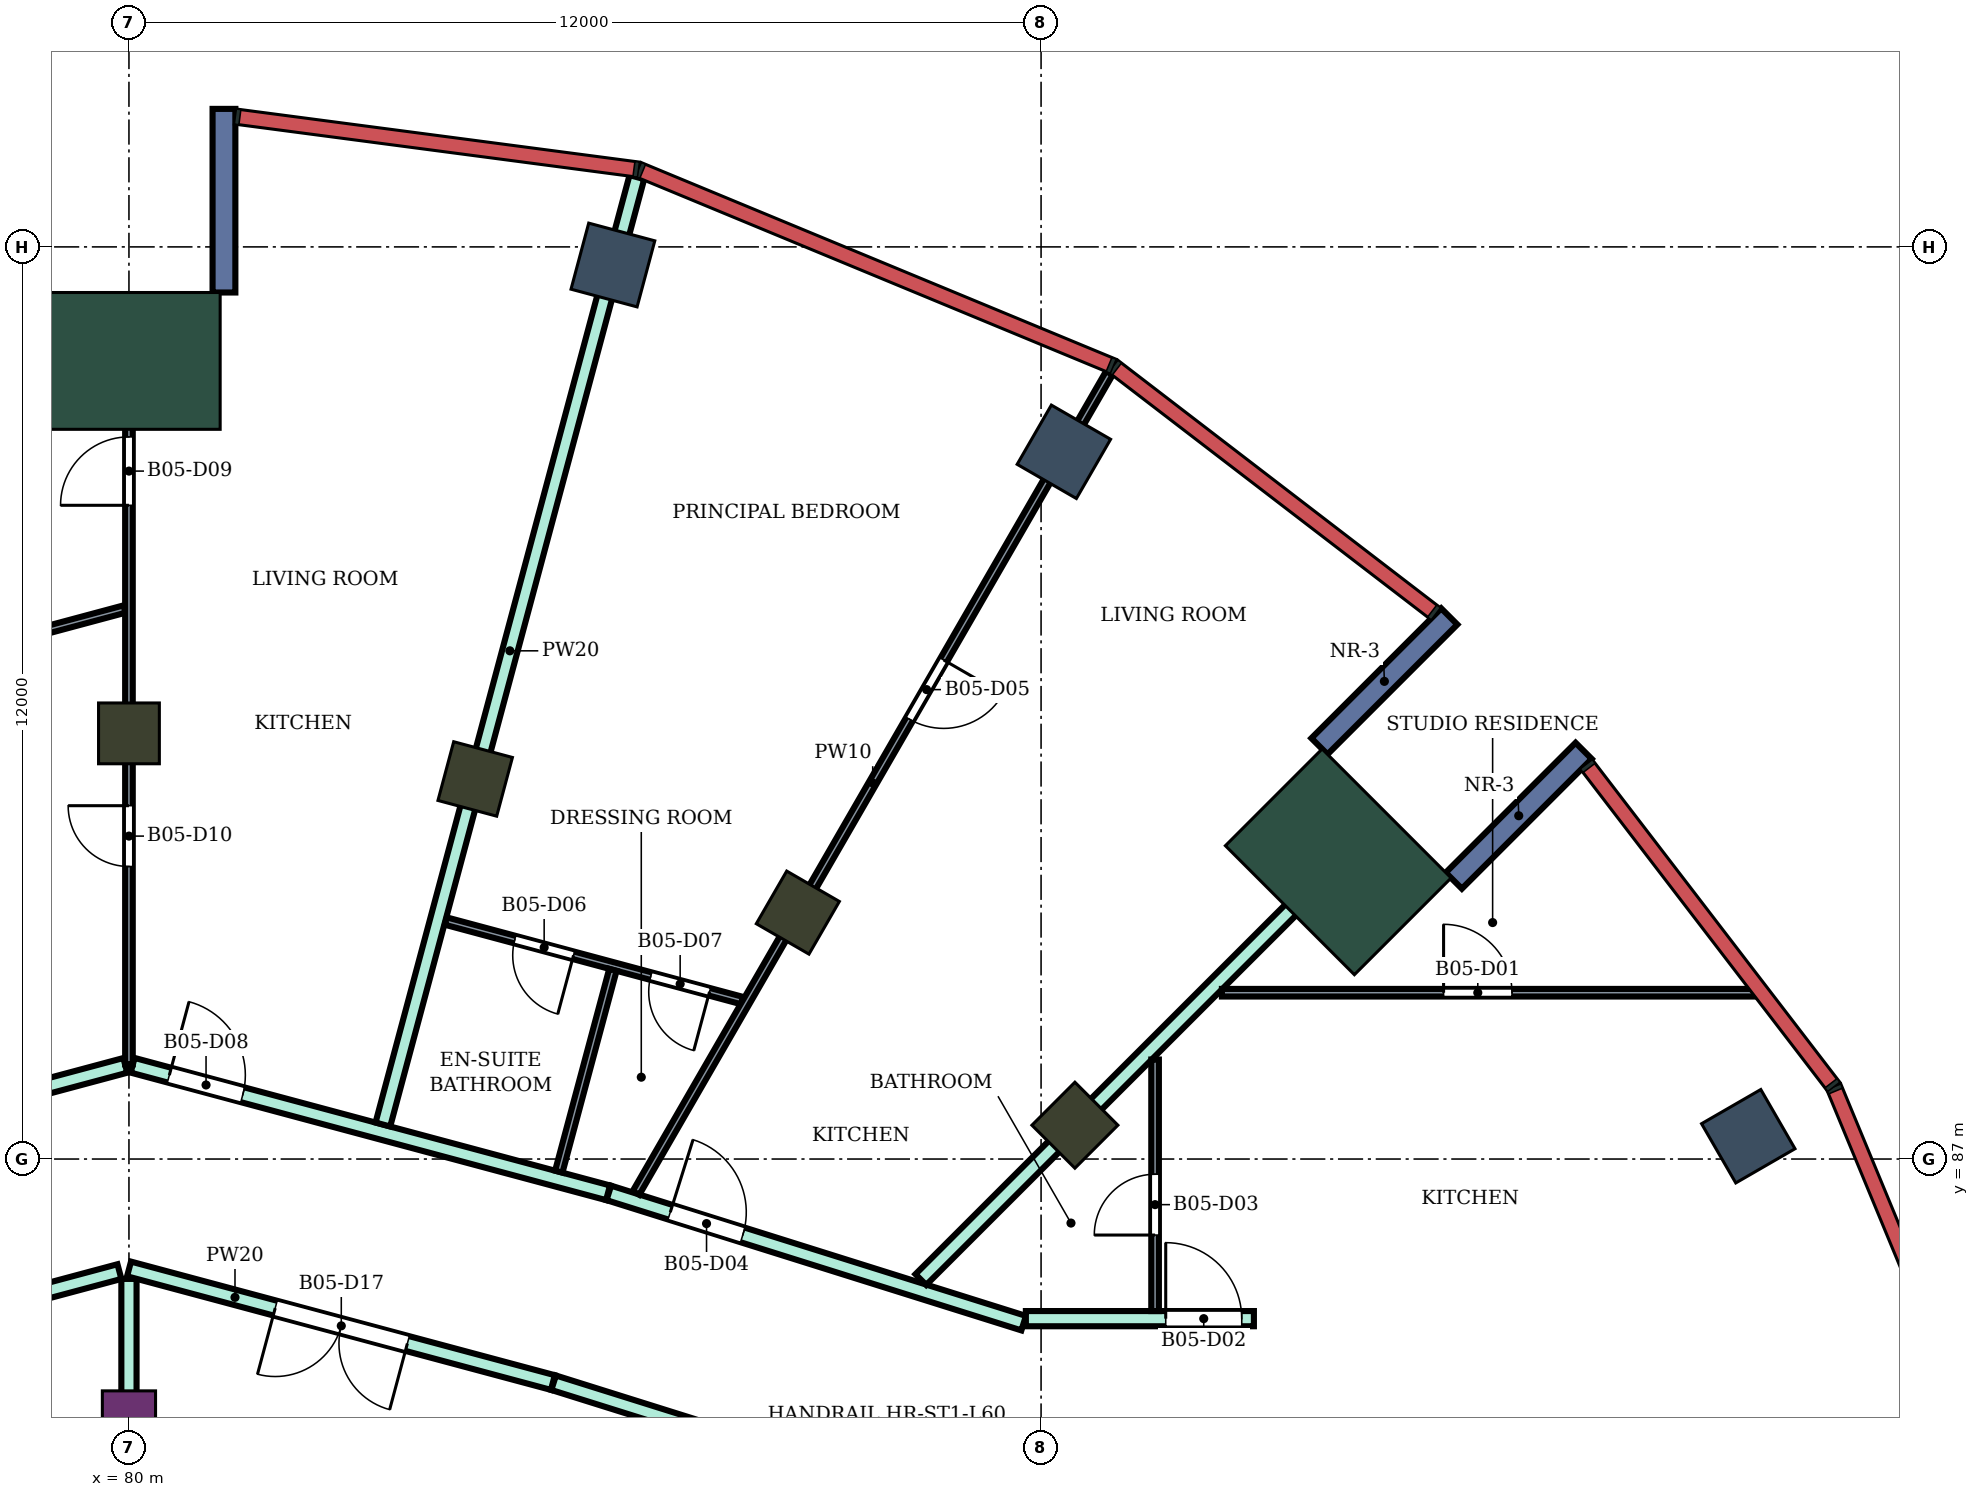
"""IFC4 building model, lengths in metres.
Left out: names, types, materials, properties, quantities, classifications, styles, units other than length and angle.
Written with IfcOpenShell. Run it as: python <this file> out.ifc"""

import sys

from ifc_helpers import new_model, si_unit, direction, frame, frame_2d, origin, origin_2d, place, context, subcontext, project, spatial, rectangle, extrude, element, fill, save


model = new_model("IFC4")
c1 = context("Model", 3, precision=1e-05, world=origin(), true_north=direction((0.0, 1.0)))
c2 = subcontext(c1, "Body", "Model", "MODEL_VIEW")
j1 = project(units=[si_unit("LENGTHUNIT", "METRE"), si_unit("PLANEANGLEUNIT", "RADIAN")], contexts=[c1])
p1 = place(None, origin())
s1 = spatial("IfcSite", under=j1, at=p1, CompositionType="ELEMENT")
p2 = place(p1, origin())
s2 = spatial("IfcBuilding", under=s1, at=p2, CompositionType="ELEMENT")
p3 = place(p2, frame((0.0, 0.0, 262.5)))
s3 = spatial("IfcBuildingStorey", under=s2, at=p3, CompositionType="ELEMENT", Elevation=262.5)
for number, where, z_axis, x_axis in (
    (1, (101.304, 87.3, 0.0), (0.0, 0.0, 1.0), (0.866, 0.5, 0.0)),
    (2, (92.3, 96.304, 0.0), (0.0, 0.0, 1.0), (0.5, 0.866, 0.0)),
    (3, (86.367, 98.762, 0.0), (0.0, 0.0, 1.0), (0.259, 0.966, 0.0)),
):
    element("IfcColumn", number, at=place(p3, frame(where, z_axis=z_axis, x_axis=x_axis)), inside=s3, PredefinedType="COLUMN", context=c2, shape_type="SweptSolid", body=[
        extrude(rectangle(XDim=0.9, YDim=0.9, at=origin_2d()), origin(), (0.0, 0.0, 1.0), 4.2),
    ])
for number, where, z_axis, x_axis in (
    (4, (92.445, 87.445, 0.0), (0.0, 0.0, 1.0), (0.707, 0.707, 0.0)),
    (5, (88.8, 90.242, 0.0), (0.0, 0.0, 1.0), (0.5, 0.866, 0.0)),
    (6, (84.555, 92.0, 0.0), (0.0, 0.0, 1.0), (0.259, 0.966, 0.0)),
    (7, (80.0, 92.6, 0.0), (0.0, 0.0, 1.0), (0.0, 1.0, 0.0)),
):
    element("IfcColumn", number, at=place(p3, frame(where, z_axis=z_axis, x_axis=x_axis)), inside=s3, PredefinedType="COLUMN", context=c2, shape_type="SweptSolid", body=[
        extrude(rectangle(XDim=0.8, YDim=0.8, at=origin_2d()), origin(), (0.0, 0.0, 1.0), 4.2),
    ])
p4 = place(p3, frame((80.0, 83.6, 0.0), z_axis=(0.0, 0.0, 1.0), x_axis=(0.0, 1.0, 0.0)))
e8 = element("IfcColumn", 8, at=p4, inside=s3, PredefinedType="COLUMN", context=c2, shape_type="SweptSolid", body=[
    extrude(rectangle(XDim=0.7, YDim=0.7, at=origin_2d()), origin(), (0.0, 0.0, 1.0), 4.2),
])
for number, where, z_axis, x_axis in (
    (9, (95.91, 90.91, 0.0), (0.0, 0.0, 1.0), (0.707, 0.707, 0.0)),
    (10, (80.0, 97.5, 0.0), (0.0, 0.0, 1.0), (0.0, 1.0, 0.0)),
):
    element("IfcColumn", number, at=place(p3, frame(where, z_axis=z_axis, x_axis=x_axis)), inside=s3, PredefinedType="COLUMN", context=c2, shape_type="SweptSolid", body=[
        extrude(rectangle(XDim=1.8, YDim=2.4, at=origin_2d()), origin(), (0.0, 0.0, 1.0), 4.2),
    ])
for number, where, z_axis, x_axis in (
    (11, (97.43, 90.662, 0.0), (0.0, 0.0, 1.0), (0.707, 0.707, 0.0)),
    (12, (95.662, 92.43, 0.0), (0.0, 0.0, 1.0), (0.707, 0.707, 0.0)),
    (13, (81.25, 98.4, 0.0), (0.0, 0.0, 1.0), (0.0, 1.0, 0.0)),
):
    element("IfcWall", number, at=place(p3, frame(where, z_axis=z_axis, x_axis=x_axis)), inside=s3, PredefinedType="NOTDEFINED", context=c2, shape_type="SweptSolid", body=[
        extrude(rectangle(XDim=2.416, YDim=0.3, at=frame_2d((1.208, 0.0))), origin(), (0.0, 0.0, 1.0), 4.2),
    ])
p5 = place(p3, frame((73.687, 86.554, 0.0), z_axis=(0.0, 0.0, 1.0), x_axis=(0.965961994098, 0.258684027257, 0.0)))
e14 = element("IfcWall", 14, at=p5, inside=s3, PredefinedType="PARTITIONING", context=c2, shape_type="SweptSolid", body=[
    extrude(rectangle(XDim=6.486, YDim=0.2, at=frame_2d((3.243, 0.0))), origin(), (0.0, 0.0, 1.0), 3.75),
])
p6 = place(p3, frame((74.413, 84.057, 0.0), z_axis=(0.0, 0.0, 1.0), x_axis=(0.965972135939, 0.258646153246, 0.0)))
e15 = element("IfcWall", 15, at=p6, inside=s3, PredefinedType="PARTITIONING", context=c2, shape_type="SweptSolid", body=[
    extrude(rectangle(XDim=5.654, YDim=0.2, at=frame_2d((2.827, 0.0))), origin(), (0.0, 0.0, 1.0), 3.75),
])
p7 = place(p6, frame((2.593, 0.0, 0.0)))
e16 = element("IfcOpeningElement", 16, at=p7, cuts=e15, PredefinedType="OPENING", context=c2, shape_type="SweptSolid", body=[
    extrude(rectangle(XDim=0.9, YDim=2.1, at=frame_2d((0.45, 1.05))), frame((0.0, 0.11, 0.0), z_axis=(0.0, -1.0, 0.0), x_axis=(1.0, 0.0, 0.0)), (0.0, 0.0, 1.0), 0.22),
])
p8 = place(p3, frame((80.0, 82.7, 0.0), z_axis=(0.0, 0.0, 1.0), x_axis=(0.0, 1.0, 0.0)))
e17 = element("IfcWall", 17, at=p8, inside=s3, PredefinedType="PARTITIONING", context=c2, shape_type="SweptSolid", body=[
    extrude(rectangle(XDim=2.723, YDim=0.2, at=frame_2d((1.362, 0.0))), origin(), (0.0, 0.0, 1.0), 3.75),
])
p9 = place(p3, frame((80.048, 88.233, 0.0), z_axis=(0.0, 0.0, 1.0), x_axis=(0.965867917069, -0.259035068625, 0.0)))
e18 = element("IfcWall", 18, at=p9, inside=s3, PredefinedType="PARTITIONING", context=c2, shape_type="SweptSolid", body=[
    extrude(rectangle(XDim=6.476, YDim=0.2, at=frame_2d((3.238, 0.0))), origin(), (0.0, 0.0, 1.0), 3.75),
])
p10 = place(p9, frame((0.5, 0.0, 0.0)))
e19 = element("IfcOpeningElement", 19, at=p10, cuts=e18, PredefinedType="OPENING", context=c2, shape_type="SweptSolid", body=[
    extrude(rectangle(XDim=1.0, YDim=2.1, at=frame_2d((0.5, 1.05))), frame((0.0, 0.11, 0.0), z_axis=(0.0, -1.0, 0.0), x_axis=(1.0, 0.0, 0.0)), (0.0, 0.0, 1.0), 0.22),
])
p11 = place(p3, frame((80.001, 85.554, 0.0), z_axis=(0.0, 0.0, 1.0), x_axis=(0.965917658836, -0.258849524528, 0.0)))
e20 = element("IfcWall", 20, at=p11, inside=s3, PredefinedType="PARTITIONING", context=c2, shape_type="SweptSolid", body=[
    extrude(rectangle(XDim=5.773, YDim=0.2, at=frame_2d((2.887, 0.0))), origin(), (0.0, 0.0, 1.0), 3.75),
])
p12 = place(p11, frame((1.991, 0.0, 0.0)))
e21 = element("IfcOpeningElement", 21, at=p12, cuts=e20, PredefinedType="OPENING", context=c2, shape_type="SweptSolid", body=[
    extrude(rectangle(XDim=1.8, YDim=2.1, at=frame_2d((0.9, 1.05))), frame((0.0, 0.11, 0.0), z_axis=(0.0, -1.0, 0.0), x_axis=(1.0, 0.0, 0.0)), (0.0, 0.0, 1.0), 0.22),
])
p13 = place(p3, frame((83.341, 87.454, 0.0), z_axis=(0.0, 0.0, 1.0), x_axis=(0.258971872038, 0.965884863477, 0.0)))
e22 = element("IfcWall", 22, at=p13, inside=s3, PredefinedType="PARTITIONING", context=c2, shape_type="SweptSolid", body=[
    extrude(rectangle(XDim=12.904, YDim=0.2, at=frame_2d((6.452, 0.0))), origin(), (0.0, 0.0, 1.0), 3.75),
])
p14 = place(p3, frame((85.587, 84.057, 0.0), z_axis=(0.0, 0.0, 1.0), x_axis=(0.954210767728, -0.299135104513, 0.0)))
e23 = element("IfcWall", 23, at=p14, inside=s3, PredefinedType="PARTITIONING", context=c2, shape_type="SweptSolid", body=[
    extrude(rectangle(XDim=2.424, YDim=0.2, at=frame_2d((1.212, 0.0))), origin(), (0.0, 0.0, 1.0), 3.75),
])
p15 = place(p3, frame((86.313, 86.554, 0.0), z_axis=(0.0, 0.0, 1.0), x_axis=(0.954081217458, -0.299548043717, 0.0)))
e24 = element("IfcWall", 24, at=p15, inside=s3, PredefinedType="PARTITIONING", context=c2, shape_type="SweptSolid", body=[
    extrude(rectangle(XDim=5.721, YDim=0.2, at=frame_2d((2.86, 0.0))), origin(), (0.0, 0.0, 1.0), 3.75),
])
p16 = place(p15, frame((0.848, 0.0, 0.0)))
e25 = element("IfcOpeningElement", 25, at=p16, cuts=e24, PredefinedType="OPENING", context=c2, shape_type="SweptSolid", body=[
    extrude(rectangle(XDim=1.0, YDim=2.1, at=frame_2d((0.5, 1.05))), frame((0.0, 0.11, 0.0), z_axis=(0.0, -1.0, 0.0), x_axis=(1.0, 0.0, 0.0)), (0.0, 0.0, 1.0), 0.22),
])
p17 = place(p3, frame((90.418, 85.414, 0.0), z_axis=(0.0, 0.0, 1.0), x_axis=(0.707265310761, 0.706948216063, 0.0)))
e26 = element("IfcWall", 26, at=p17, inside=s3, PredefinedType="PARTITIONING", context=c2, shape_type="SweptSolid", body=[
    extrude(rectangle(XDim=8.469, YDim=0.2, at=frame_2d((4.235, 0.0))), origin(), (0.0, 0.0, 1.0), 3.75),
])
p18 = place(p3, frame((91.8, 84.9, 0.0), z_axis=(0.0, 0.0, 1.0), x_axis=(1.0, 0.0, 0.0)))
e27 = element("IfcWall", 27, at=p18, inside=s3, PredefinedType="PARTITIONING", context=c2, shape_type="SweptSolid", body=[
    extrude(rectangle(XDim=3.0, YDim=0.2, at=frame_2d((1.5, 0.0))), origin(), (0.0, 0.0, 1.0), 3.75),
])
p19 = place(p18, frame((1.84, 0.0, 0.0)))
e28 = element("IfcOpeningElement", 28, at=p19, cuts=e27, PredefinedType="OPENING", context=c2, shape_type="SweptSolid", body=[
    extrude(rectangle(XDim=1.0, YDim=2.1, at=frame_2d((0.5, 1.05))), frame((0.0, 0.11, 0.0), z_axis=(0.0, -1.0, 0.0), x_axis=(1.0, 0.0, 0.0)), (0.0, 0.0, 1.0), 0.22),
])
p20 = place(p3, frame((75.236, 92.973, 0.0), z_axis=(0.0, 0.0, 1.0), x_axis=(0.965831212389, 0.259171891173, 0.0)))
e29 = element("IfcWall", 29, at=p20, inside=s3, PredefinedType="PARTITIONING", context=c2, shape_type="SweptSolid", body=[
    extrude(rectangle(XDim=4.872, YDim=0.1, at=frame_2d((2.436, 0.0))), origin(), (0.0, 0.0, 1.0), 3.75),
])
p21 = place(p3, frame((80.0, 88.246, 0.0), z_axis=(0.0, 0.0, 1.0), x_axis=(0.0, 1.0, 0.0)))
e30 = element("IfcWall", 30, at=p21, inside=s3, PredefinedType="PARTITIONING", context=c2, shape_type="SweptSolid", body=[
    extrude(rectangle(XDim=9.954, YDim=0.1, at=frame_2d((4.977, 0.0))), origin(), (0.0, 0.0, 1.0), 3.75),
])
p22 = place(p21, frame((7.354, 0.0, 0.0)))
e31 = element("IfcOpeningElement", 31, at=p22, cuts=e30, PredefinedType="OPENING", context=c2, shape_type="SweptSolid", body=[
    extrude(rectangle(XDim=0.9, YDim=2.1, at=frame_2d((0.45, 1.05))), frame((0.0, 0.06, 0.0), z_axis=(0.0, -1.0, 0.0), x_axis=(1.0, 0.0, 0.0)), (0.0, 0.0, 1.0), 0.12),
])
p23 = place(p21, frame((2.603, 0.0, 0.0)))
e32 = element("IfcOpeningElement", 32, at=p23, cuts=e30, PredefinedType="OPENING", context=c2, shape_type="SweptSolid", body=[
    extrude(rectangle(XDim=0.8, YDim=2.1, at=frame_2d((0.4, 1.05))), frame((0.0, 0.06, 0.0), z_axis=(0.0, -1.0, 0.0), x_axis=(1.0, 0.0, 0.0)), (0.0, 0.0, 1.0), 0.12),
])
p24 = place(p3, frame((84.168, 90.131, 0.0), z_axis=(0.0, 0.0, 1.0), x_axis=(0.965828063097, -0.259183627055, 0.0)))
e33 = element("IfcWall", 33, at=p24, inside=s3, PredefinedType="PARTITIONING", context=c2, shape_type="SweptSolid", body=[
    extrude(rectangle(XDim=4.035, YDim=0.1, at=frame_2d((2.018, 0.0))), origin(), (0.0, 0.0, 1.0), 3.75),
])
p25 = place(p24, frame((0.94, 0.0, 0.0)))
e34 = element("IfcOpeningElement", 34, at=p25, cuts=e33, PredefinedType="OPENING", context=c2, shape_type="SweptSolid", body=[
    extrude(rectangle(XDim=0.8, YDim=2.1, at=frame_2d((0.4, 1.05))), frame((0.0, 0.06, 0.0), z_axis=(0.0, -1.0, 0.0), x_axis=(1.0, 0.0, 0.0)), (0.0, 0.0, 1.0), 0.12),
])
p26 = place(p24, frame((2.792, 0.0, 0.0)))
e35 = element("IfcOpeningElement", 35, at=p26, cuts=e33, PredefinedType="OPENING", context=c2, shape_type="SweptSolid", body=[
    extrude(rectangle(XDim=0.8, YDim=2.1, at=frame_2d((0.4, 1.05))), frame((0.0, 0.06, 0.0), z_axis=(0.0, -1.0, 0.0), x_axis=(1.0, 0.0, 0.0)), (0.0, 0.0, 1.0), 0.12),
])
p27 = place(p3, frame((85.655, 86.834, 0.0), z_axis=(0.0, 0.0, 1.0), x_axis=(0.259005329799, 0.965875892201, 0.0)))
e36 = element("IfcWall", 36, at=p27, inside=s3, PredefinedType="PARTITIONING", context=c2, shape_type="SweptSolid", body=[
    extrude(rectangle(XDim=2.75, YDim=0.1, at=frame_2d((1.375, 0.0))), origin(), (0.0, 0.0, 1.0), 3.75),
])
p28 = place(p3, frame((86.671, 86.554, 0.0), z_axis=(0.0, 0.0, 1.0), x_axis=(0.500005228967, 0.866022384818, 0.0)))
e37 = element("IfcWall", 37, at=p28, inside=s3, PredefinedType="PARTITIONING", context=c2, shape_type="SweptSolid", body=[
    extrude(rectangle(XDim=12.456, YDim=0.1, at=frame_2d((6.228, 0.0))), origin(), (0.0, 0.0, 1.0), 3.75),
])
p29 = place(p28, frame((7.196, 0.0, 0.0)))
e38 = element("IfcOpeningElement", 38, at=p29, cuts=e37, PredefinedType="OPENING", context=c2, shape_type="SweptSolid", body=[
    extrude(rectangle(XDim=0.9, YDim=2.1, at=frame_2d((0.45, 1.05))), frame((0.0, 0.06, 0.0), z_axis=(0.0, -1.0, 0.0), x_axis=(1.0, 0.0, 0.0)), (0.0, 0.0, 1.0), 0.12),
])
p30 = place(p3, frame((93.5, 85.0, 0.0), z_axis=(0.0, 0.0, 1.0), x_axis=(0.0, 1.0, 0.0)))
e39 = element("IfcWall", 39, at=p30, inside=s3, PredefinedType="PARTITIONING", context=c2, shape_type="SweptSolid", body=[
    extrude(rectangle(XDim=3.309, YDim=0.1, at=frame_2d((1.655, 0.0))), origin(), (0.0, 0.0, 1.0), 3.75),
])
p31 = place(p30, frame((1.0, 0.0, 0.0)))
e40 = element("IfcOpeningElement", 40, at=p31, cuts=e39, PredefinedType="OPENING", context=c2, shape_type="SweptSolid", body=[
    extrude(rectangle(XDim=0.8, YDim=2.1, at=frame_2d((0.4, 1.05))), frame((0.0, 0.06, 0.0), z_axis=(0.0, -1.0, 0.0), x_axis=(1.0, 0.0, 0.0)), (0.0, 0.0, 1.0), 0.12),
])
p32 = place(p3, frame((94.379, 89.188, 0.0), z_axis=(0.0, 0.0, 1.0), x_axis=(1.0, 0.0, 0.0)))
e41 = element("IfcWall", 41, at=p32, inside=s3, PredefinedType="PARTITIONING", context=c2, shape_type="SweptSolid", body=[
    extrude(rectangle(XDim=7.021, YDim=0.1, at=frame_2d((3.51, 0.0))), origin(), (0.0, 0.0, 1.0), 3.75),
])
p33 = place(p32, frame((2.917, 0.0, 0.0)))
e42 = element("IfcOpeningElement", 42, at=p33, cuts=e41, PredefinedType="OPENING", context=c2, shape_type="SweptSolid", body=[
    extrude(rectangle(XDim=0.9, YDim=2.1, at=frame_2d((0.45, 1.05))), frame((0.0, 0.06, 0.0), z_axis=(0.0, -1.0, 0.0), x_axis=(1.0, 0.0, 0.0)), (0.0, 0.0, 1.0), 0.12),
])
p34 = place(p33, origin())
e43 = element("IfcDoor", 43, at=p34, inside=s3, OperationType="SINGLE_SWING_LEFT", PredefinedType="DOOR", context=c2, shape_type="SweptSolid", body=[
    extrude(rectangle(XDim=0.9, YDim=2.1, at=frame_2d((0.45, 1.05))), frame((0.0, 0.025, 0.0), z_axis=(0.0, -1.0, 0.0), x_axis=(1.0, 0.0, 0.0)), (0.0, 0.0, 1.0), 0.05),
])
fill(e42, e43)
p35 = place(p19, origin())
e44 = element("IfcDoor", 44, at=p35, inside=s3, OperationType="SINGLE_SWING_LEFT", PredefinedType="DOOR", context=c2, shape_type="SweptSolid", body=[
    extrude(rectangle(XDim=1.0, YDim=2.1, at=frame_2d((0.5, 1.05))), frame((0.0, 0.025, 0.0), z_axis=(0.0, -1.0, 0.0), x_axis=(1.0, 0.0, 0.0)), (0.0, 0.0, 1.0), 0.05),
])
fill(e28, e44)
p36 = place(p31, origin())
e45 = element("IfcDoor", 45, at=p36, inside=s3, OperationType="SINGLE_SWING_LEFT", PredefinedType="DOOR", context=c2, shape_type="SweptSolid", body=[
    extrude(rectangle(XDim=0.8, YDim=2.1, at=frame_2d((0.4, 1.05))), frame((0.0, 0.025, 0.0), z_axis=(0.0, -1.0, 0.0), x_axis=(1.0, 0.0, 0.0)), (0.0, 0.0, 1.0), 0.05),
])
fill(e40, e45)
p37 = place(p16, origin())
e46 = element("IfcDoor", 46, at=p37, inside=s3, OperationType="SINGLE_SWING_LEFT", PredefinedType="DOOR", context=c2, shape_type="SweptSolid", body=[
    extrude(rectangle(XDim=1.0, YDim=2.1, at=frame_2d((0.5, 1.05))), frame((0.0, 0.025, 0.0), z_axis=(0.0, -1.0, 0.0), x_axis=(1.0, 0.0, 0.0)), (0.0, 0.0, 1.0), 0.05),
])
fill(e25, e46)
p38 = place(p29, frame((0.9, 0.0, 0.0), z_axis=(0.0, 0.0, 1.0), x_axis=(-1.0, 0.0, 0.0)))
e47 = element("IfcDoor", 47, at=p38, inside=s3, OperationType="SINGLE_SWING_LEFT", PredefinedType="DOOR", context=c2, shape_type="SweptSolid", body=[
    extrude(rectangle(XDim=0.9, YDim=2.1, at=frame_2d((0.45, 1.05))), frame((0.0, 0.025, 0.0), z_axis=(0.0, -1.0, 0.0), x_axis=(1.0, 0.0, 0.0)), (0.0, 0.0, 1.0), 0.05),
])
fill(e38, e47)
p39 = place(p25, frame((0.8, 0.0, 0.0), z_axis=(0.0, 0.0, 1.0), x_axis=(-1.0, 0.0, 0.0)))
e48 = element("IfcDoor", 48, at=p39, inside=s3, OperationType="SINGLE_SWING_LEFT", PredefinedType="DOOR", context=c2, shape_type="SweptSolid", body=[
    extrude(rectangle(XDim=0.8, YDim=2.1, at=frame_2d((0.4, 1.05))), frame((0.0, 0.025, 0.0), z_axis=(0.0, -1.0, 0.0), x_axis=(1.0, 0.0, 0.0)), (0.0, 0.0, 1.0), 0.05),
])
fill(e34, e48)
p40 = place(p26, frame((0.8, 0.0, 0.0), z_axis=(0.0, 0.0, 1.0), x_axis=(-1.0, 0.0, 0.0)))
e49 = element("IfcDoor", 49, at=p40, inside=s3, OperationType="SINGLE_SWING_LEFT", PredefinedType="DOOR", context=c2, shape_type="SweptSolid", body=[
    extrude(rectangle(XDim=0.8, YDim=2.1, at=frame_2d((0.4, 1.05))), frame((0.0, 0.025, 0.0), z_axis=(0.0, -1.0, 0.0), x_axis=(1.0, 0.0, 0.0)), (0.0, 0.0, 1.0), 0.05),
])
fill(e35, e49)
p41 = place(p10, origin())
e50 = element("IfcDoor", 50, at=p41, inside=s3, OperationType="SINGLE_SWING_LEFT", PredefinedType="DOOR", context=c2, shape_type="SweptSolid", body=[
    extrude(rectangle(XDim=1.0, YDim=2.1, at=frame_2d((0.5, 1.05))), frame((0.0, 0.025, 0.0), z_axis=(0.0, -1.0, 0.0), x_axis=(1.0, 0.0, 0.0)), (0.0, 0.0, 1.0), 0.05),
])
fill(e19, e50)
p42 = place(p22, origin())
e51 = element("IfcDoor", 51, at=p42, inside=s3, OperationType="SINGLE_SWING_LEFT", PredefinedType="DOOR", context=c2, shape_type="SweptSolid", body=[
    extrude(rectangle(XDim=0.9, YDim=2.1, at=frame_2d((0.45, 1.05))), frame((0.0, 0.025, 0.0), z_axis=(0.0, -1.0, 0.0), x_axis=(1.0, 0.0, 0.0)), (0.0, 0.0, 1.0), 0.05),
])
fill(e31, e51)
p43 = place(p23, origin())
e52 = element("IfcDoor", 52, at=p43, inside=s3, OperationType="SINGLE_SWING_RIGHT", PredefinedType="DOOR", context=c2, shape_type="SweptSolid", body=[
    extrude(rectangle(XDim=0.8, YDim=2.1, at=frame_2d((0.4, 1.05))), frame((0.0, 0.025, 0.0), z_axis=(0.0, -1.0, 0.0), x_axis=(1.0, 0.0, 0.0)), (0.0, 0.0, 1.0), 0.05),
])
fill(e32, e52)
p44 = place(p12, frame((1.8, 0.0, 0.0), z_axis=(0.0, 0.0, 1.0), x_axis=(-1.0, 0.0, 0.0)))
e53 = element("IfcDoor", 53, at=p44, inside=s3, OperationType="DOUBLE_DOOR_SINGLE_SWING", PredefinedType="DOOR", context=c2, shape_type="SweptSolid", body=[
    extrude(rectangle(XDim=1.8, YDim=2.1, at=frame_2d((0.9, 1.05))), frame((0.0, 0.025, 0.0), z_axis=(0.0, -1.0, 0.0), x_axis=(1.0, 0.0, 0.0)), (0.0, 0.0, 1.0), 0.05),
])
fill(e21, e53)
save(model, sys.argv[1])
